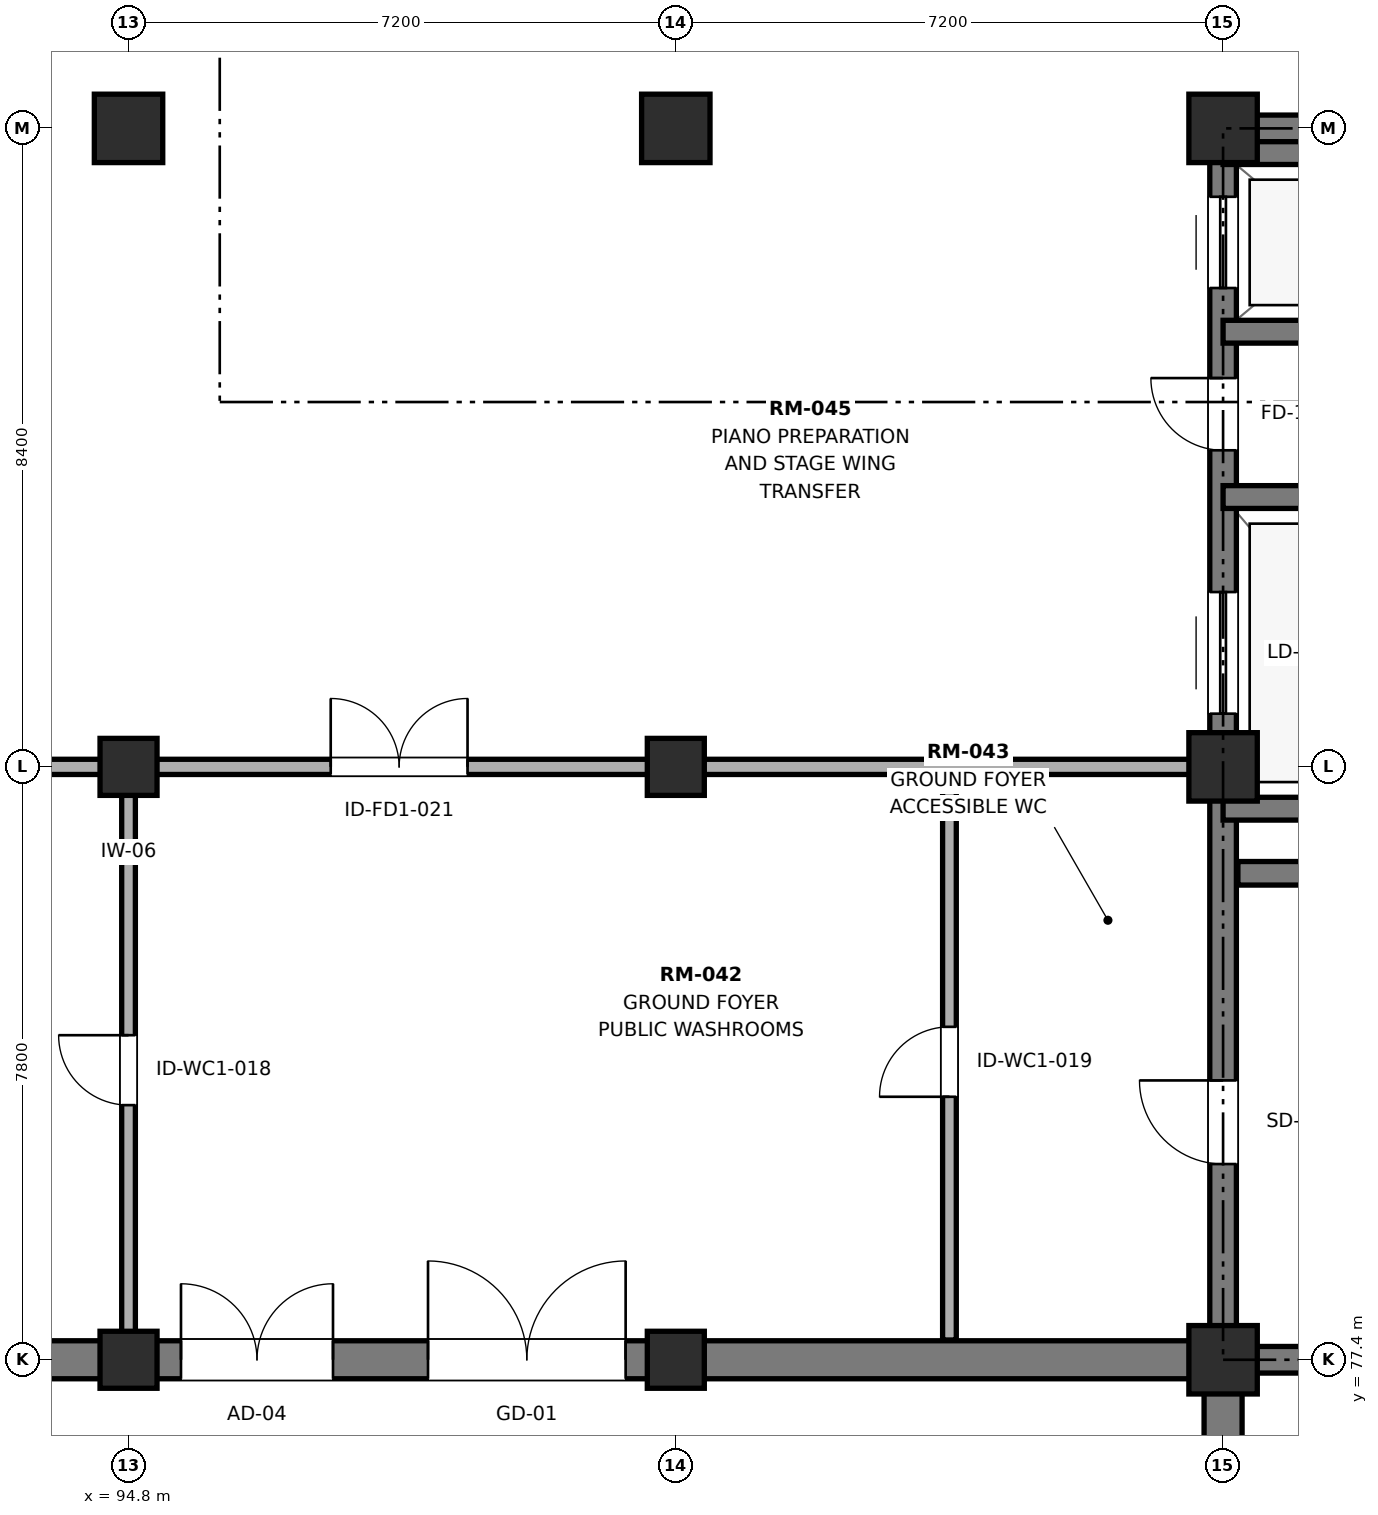
"""IFC4 building model, lengths in metres.
Left out: names, types, materials, properties, quantities, classifications, styles, units other than length and angle.
Written with IfcOpenShell. Run it as: python <this file> out.ifc"""

import sys

from ifc_helpers import new_model, si_unit, direction, frame, frame_2d, origin, origin_2d, place, context, subcontext, project, spatial, rectangle, extrude, element, fill, save


model = new_model("IFC4")
c1 = context("Model", 3, precision=1e-05, world=origin(), true_north=direction((0.0, 1.0)))
c2 = subcontext(c1, "Body", "Model", "MODEL_VIEW")
j1 = project(units=[si_unit("LENGTHUNIT", "METRE"), si_unit("PLANEANGLEUNIT", "RADIAN")], contexts=[c1])
p1 = place(None, origin())
s1 = spatial("IfcSite", under=j1, at=p1, CompositionType="ELEMENT")
p2 = place(p1, origin())
s2 = spatial("IfcBuilding", under=s1, at=p2, CompositionType="ELEMENT")
p3 = place(p2, origin())
s3 = spatial("IfcBuildingStorey", under=s2, at=p3, CompositionType="ELEMENT", Elevation=0.0)
for number, where, z_axis, x_axis in (
    (1, (94.8, 77.4, 0.0), (0.0, 0.0, 1.0), (1.0, 0.0, 0.0)),
    (2, (94.8, 85.2, 0.0), (0.0, 0.0, 1.0), (1.0, 0.0, 0.0)),
):
    element("IfcColumn", number, at=place(p3, frame(where, z_axis=z_axis, x_axis=x_axis)), inside=s3, PredefinedType="COLUMN", context=c2, shape_type="SweptSolid", body=[
        extrude(rectangle(XDim=0.75, YDim=0.75, at=origin_2d()), origin(), (0.0, 0.0, 1.0), 5.4),
    ])
p4 = place(p3, frame((94.8, 93.6, 0.0), z_axis=(0.0, 0.0, 1.0), x_axis=(1.0, 0.0, 0.0)))
e3 = element("IfcColumn", 3, at=p4, inside=s3, PredefinedType="COLUMN", context=c2, shape_type="SweptSolid", body=[
    extrude(rectangle(XDim=0.9, YDim=0.9, at=origin_2d()), origin(), (0.0, 0.0, 1.0), 5.4),
])
for number, where, z_axis, x_axis in (
    (4, (102.0, 77.4, 0.0), (0.0, 0.0, 1.0), (1.0, 0.0, 0.0)),
    (5, (102.0, 85.2, 0.0), (0.0, 0.0, 1.0), (1.0, 0.0, 0.0)),
):
    element("IfcColumn", number, at=place(p3, frame(where, z_axis=z_axis, x_axis=x_axis)), inside=s3, PredefinedType="COLUMN", context=c2, shape_type="SweptSolid", body=[
        extrude(rectangle(XDim=0.75, YDim=0.75, at=origin_2d()), origin(), (0.0, 0.0, 1.0), 5.4),
    ])
for number, where, z_axis, x_axis in (
    (6, (102.0, 93.6, 0.0), (0.0, 0.0, 1.0), (1.0, 0.0, 0.0)),
    (7, (109.2, 77.4, 0.0), (0.0, 0.0, 1.0), (1.0, 0.0, 0.0)),
    (8, (109.2, 85.2, 0.0), (0.0, 0.0, 1.0), (1.0, 0.0, 0.0)),
    (9, (109.2, 93.6, 0.0), (0.0, 0.0, 1.0), (1.0, 0.0, 0.0)),
):
    element("IfcColumn", number, at=place(p3, frame(where, z_axis=z_axis, x_axis=x_axis)), inside=s3, PredefinedType="COLUMN", context=c2, shape_type="SweptSolid", body=[
        extrude(rectangle(XDim=0.9, YDim=0.9, at=origin_2d()), origin(), (0.0, 0.0, 1.0), 5.4),
    ])
p5 = place(p3, frame((58.59, 77.4, 0.0), z_axis=(0.0, 0.0, 1.0), x_axis=(1.0, 0.0, 0.0)))
e10 = element("IfcWall", 10, at=p5, inside=s3, PredefinedType="SOLIDWALL", context=c2, shape_type="SweptSolid", body=[
    extrude(rectangle(XDim=50.82, YDim=0.5, at=frame_2d((25.41, 0.0))), origin(), (0.0, 0.0, 1.0), 5.4),
])
p6 = place(p5, frame((29.5, 0.0, 0.0)))
e11 = element("IfcOpeningElement", 11, at=p6, cuts=e10, PredefinedType="OPENING", context=c2, shape_type="SweptSolid", body=[
    extrude(rectangle(XDim=2.0, YDim=2.45, at=frame_2d((1.0, 1.225))), frame((0.0, 0.26, 0.0), z_axis=(0.0, -1.0, 0.0), x_axis=(1.0, 0.0, 0.0)), (0.0, 0.0, 1.0), 0.52),
])
p7 = place(p5, frame((36.9, 0.0, 0.0)))
e12 = element("IfcOpeningElement", 12, at=p7, cuts=e10, PredefinedType="OPENING", context=c2, shape_type="SweptSolid", body=[
    extrude(rectangle(XDim=2.0, YDim=2.45, at=frame_2d((1.0, 1.225))), frame((0.0, 0.26, 0.0), z_axis=(0.0, -1.0, 0.0), x_axis=(1.0, 0.0, 0.0)), (0.0, 0.0, 1.0), 0.52),
])
p8 = place(p5, frame((40.15, 0.0, 0.0)))
e13 = element("IfcOpeningElement", 13, at=p8, cuts=e10, PredefinedType="OPENING", context=c2, shape_type="SweptSolid", body=[
    extrude(rectangle(XDim=2.6, YDim=2.8, at=frame_2d((1.3, 1.4))), frame((0.0, 0.26, 0.0), z_axis=(0.0, -1.0, 0.0), x_axis=(1.0, 0.0, 0.0)), (0.0, 0.0, 1.0), 0.52),
])
p9 = place(p3, frame((109.2, 46.41, 0.0), z_axis=(0.0, 0.0, 1.0), x_axis=(0.0, 1.0, 0.0)))
e14 = element("IfcWall", 14, at=p9, inside=s3, PredefinedType="SOLIDWALL", context=c2, shape_type="SweptSolid", body=[
    extrude(rectangle(XDim=30.78, YDim=0.5, at=frame_2d((15.39, 0.0))), origin(), (0.0, 0.0, 1.0), 5.4),
])
p10 = place(p9, frame((12.0, 0.0, 0.0)))
e15 = element("IfcOpeningElement", 15, at=p10, cuts=e14, PredefinedType="OPENING", context=c2, shape_type="SweptSolid", body=[
    extrude(rectangle(XDim=2.0, YDim=2.45, at=frame_2d((1.0, 1.225))), frame((0.0, 0.26, 0.0), z_axis=(0.0, -1.0, 0.0), x_axis=(1.0, 0.0, 0.0)), (0.0, 0.0, 1.0), 0.52),
])
p11 = place(p3, frame((109.52, 77.4, 0.0), z_axis=(0.0, 0.0, 1.0), x_axis=(1.0, 0.0, 0.0)))
e16 = element("IfcWall", 16, at=p11, inside=s3, PredefinedType="SHEAR", context=c2, shape_type="SweptSolid", body=[
    extrude(rectangle(XDim=9.455, YDim=0.35, at=frame_2d((4.728, 0.0))), origin(), (0.0, 0.0, 1.0), 5.4),
])
p12 = place(p3, frame((109.025, 93.6, 0.0), z_axis=(0.0, 0.0, 1.0), x_axis=(1.0, 0.0, 0.0)))
e17 = element("IfcWall", 17, at=p12, inside=s3, PredefinedType="SHEAR", context=c2, shape_type="SweptSolid", body=[
    extrude(rectangle(XDim=9.95, YDim=0.35, at=frame_2d((4.975, 0.0))), origin(), (0.0, 0.0, 1.0), 5.4),
])
p13 = place(p3, frame((109.2, 77.575, 0.0), z_axis=(0.0, 0.0, 1.0), x_axis=(0.0, 1.0, 0.0)))
e18 = element("IfcWall", 18, at=p13, inside=s3, PredefinedType="SHEAR", context=c2, shape_type="SweptSolid", body=[
    extrude(rectangle(XDim=15.85, YDim=0.35, at=frame_2d((7.925, 0.0))), origin(), (0.0, 0.0, 1.0), 5.4),
])
p14 = place(p13, frame((8.325, 0.0, 0.0)))
e19 = element("IfcOpeningElement", 19, at=p14, cuts=e18, PredefinedType="OPENING", context=c2, shape_type="SweptSolid", body=[
    extrude(rectangle(XDim=1.6, YDim=2.4, at=frame_2d((0.8, 1.2))), frame((0.0, 0.185, 0.0), z_axis=(0.0, -1.0, 0.0), x_axis=(1.0, 0.0, 0.0)), (0.0, 0.0, 1.0), 0.37),
])
p15 = place(p13, frame((13.925, 0.0, 0.0)))
e20 = element("IfcOpeningElement", 20, at=p15, cuts=e18, PredefinedType="OPENING", context=c2, shape_type="SweptSolid", body=[
    extrude(rectangle(XDim=1.2, YDim=2.2, at=frame_2d((0.6, 1.1))), frame((0.0, 0.185, 0.0), z_axis=(0.0, -1.0, 0.0), x_axis=(1.0, 0.0, 0.0)), (0.0, 0.0, 1.0), 0.37),
])
p16 = place(p13, frame((11.79, 0.0, 0.0)))
e21 = element("IfcOpeningElement", 21, at=p16, cuts=e18, PredefinedType="OPENING", context=c2, shape_type="SweptSolid", body=[
    extrude(rectangle(XDim=0.95, YDim=2.1, at=frame_2d((0.475, 1.05))), frame((0.0, 0.185, 0.0), z_axis=(0.0, -1.0, 0.0), x_axis=(1.0, 0.0, 0.0)), (0.0, 0.0, 1.0), 0.37),
])
p17 = place(p13, frame((2.4, 0.0, 0.0)))
e22 = element("IfcOpeningElement", 22, at=p17, cuts=e18, PredefinedType="OPENING", context=c2, shape_type="SweptSolid", body=[
    extrude(rectangle(XDim=1.1, YDim=2.2, at=frame_2d((0.55, 1.1))), frame((0.0, 0.185, 0.0), z_axis=(0.0, -1.0, 0.0), x_axis=(1.0, 0.0, 0.0)), (0.0, 0.0, 1.0), 0.37),
])
p18 = place(p3, frame((109.395, 83.8, 0.0), z_axis=(0.0, 0.0, 1.0), x_axis=(1.0, 0.0, 0.0)))
e23 = element("IfcWall", 23, at=p18, inside=s3, PredefinedType="SHEAR", context=c2, shape_type="SweptSolid", body=[
    extrude(rectangle(XDim=9.21, YDim=0.31, at=frame_2d((4.605, 0.0))), origin(), (0.0, 0.0, 1.0), 5.4),
])
for number, where, z_axis, x_axis in (
    (24, (109.2, 84.65, 0.0), (0.0, 0.0, 1.0), (1.0, 0.0, 0.0)),
    (25, (109.2, 88.75, 0.0), (0.0, 0.0, 1.0), (1.0, 0.0, 0.0)),
):
    element("IfcWall", number, at=place(p3, frame(where, z_axis=z_axis, x_axis=x_axis)), inside=s3, PredefinedType="SHEAR", context=c2, shape_type="SweptSolid", body=[
        extrude(rectangle(XDim=3.5, YDim=0.3, at=frame_2d((1.75, 0.0))), origin(), (0.0, 0.0, 1.0), 5.4),
    ])
for number, where, z_axis, x_axis in (
    (26, (109.2, 90.925, 0.0), (0.0, 0.0, 1.0), (1.0, 0.0, 0.0)),
    (27, (109.2, 93.275, 0.0), (0.0, 0.0, 1.0), (1.0, 0.0, 0.0)),
):
    element("IfcWall", number, at=place(p3, frame(where, z_axis=z_axis, x_axis=x_axis)), inside=s3, PredefinedType="SHEAR", context=c2, shape_type="SweptSolid", body=[
        extrude(rectangle(XDim=2.8, YDim=0.3, at=frame_2d((1.4, 0.0))), origin(), (0.0, 0.0, 1.0), 5.4),
    ])
p19 = place(p3, frame((94.8, 77.55, 0.0), z_axis=(0.0, 0.0, 1.0), x_axis=(0.0, 1.0, 0.0)))
e28 = element("IfcWall", 28, at=p19, inside=s3, PredefinedType="PARTITIONING", context=c2, shape_type="SweptSolid", body=[
    extrude(rectangle(XDim=7.65, YDim=0.18, at=frame_2d((3.825, 0.0))), origin(), (0.0, 0.0, 1.0), 4.45),
])
p20 = place(p19, frame((3.2, 0.0, 0.0)))
e29 = element("IfcOpeningElement", 29, at=p20, cuts=e28, PredefinedType="OPENING", context=c2, shape_type="SweptSolid", body=[
    extrude(rectangle(XDim=0.92, YDim=2.15, at=frame_2d((0.46, 1.075))), frame((0.0, 0.1, 0.0), z_axis=(0.0, -1.0, 0.0), x_axis=(1.0, 0.0, 0.0)), (0.0, 0.0, 1.0), 0.2),
])
p21 = place(p3, frame((105.6, 77.66, 0.0), z_axis=(0.0, 0.0, 1.0), x_axis=(0.0, 1.0, 0.0)))
e30 = element("IfcWall", 30, at=p21, inside=s3, PredefinedType="PARTITIONING", context=c2, shape_type="SweptSolid", body=[
    extrude(rectangle(XDim=7.43, YDim=0.18, at=frame_2d((3.715, 0.0))), origin(), (0.0, 0.0, 1.0), 4.535),
])
p22 = place(p21, frame((3.2, 0.0, 0.0)))
e31 = element("IfcOpeningElement", 31, at=p22, cuts=e30, PredefinedType="OPENING", context=c2, shape_type="SweptSolid", body=[
    extrude(rectangle(XDim=0.92, YDim=2.15, at=frame_2d((0.46, 1.075))), frame((0.0, 0.1, 0.0), z_axis=(0.0, -1.0, 0.0), x_axis=(1.0, 0.0, 0.0)), (0.0, 0.0, 1.0), 0.2),
])
p23 = place(p3, frame((58.96, 85.2, 0.0), z_axis=(0.0, 0.0, 1.0), x_axis=(1.0, 0.0, 0.0)))
e32 = element("IfcWall", 32, at=p23, inside=s3, PredefinedType="PARTITIONING", context=c2, shape_type="SweptSolid", body=[
    extrude(rectangle(XDim=49.88, YDim=0.2, at=frame_2d((24.94, 0.0))), origin(), (0.0, 0.0, 1.0), 4.34),
])
p24 = place(p23, frame((12.0, 0.0, 0.0)))
e33 = element("IfcOpeningElement", 33, at=p24, cuts=e32, PredefinedType="OPENING", context=c2, shape_type="SweptSolid", body=[
    extrude(rectangle(XDim=1.05, YDim=2.25, at=frame_2d((0.525, 1.125))), frame((0.0, 0.11, 0.0), z_axis=(0.0, -1.0, 0.0), x_axis=(1.0, 0.0, 0.0)), (0.0, 0.0, 1.0), 0.22),
])
p25 = place(p23, frame((38.5, 0.0, 0.0)))
e34 = element("IfcOpeningElement", 34, at=p25, cuts=e32, PredefinedType="OPENING", context=c2, shape_type="SweptSolid", body=[
    extrude(rectangle(XDim=1.8, YDim=2.3, at=frame_2d((0.9, 1.15))), frame((0.0, 0.11, 0.0), z_axis=(0.0, -1.0, 0.0), x_axis=(1.0, 0.0, 0.0)), (0.0, 0.0, 1.0), 0.22),
])
p26 = place(p14, origin())
e35 = element("IfcDoor", 35, at=p26, inside=s3, OperationType="SLIDING_TO_RIGHT", PredefinedType="DOOR", context=c2, shape_type="SweptSolid", body=[
    extrude(rectangle(XDim=1.6, YDim=2.4, at=frame_2d((0.8, 1.2))), frame((0.0, 0.025, 0.0), z_axis=(0.0, -1.0, 0.0), x_axis=(1.0, 0.0, 0.0)), (0.0, 0.0, 1.0), 0.05),
])
fill(e19, e35)
p27 = place(p15, origin())
e36 = element("IfcDoor", 36, at=p27, inside=s3, OperationType="SLIDING_TO_LEFT", PredefinedType="DOOR", context=c2, shape_type="SweptSolid", body=[
    extrude(rectangle(XDim=1.2, YDim=2.2, at=frame_2d((0.6, 1.1))), frame((0.0, 0.025, 0.0), z_axis=(0.0, -1.0, 0.0), x_axis=(1.0, 0.0, 0.0)), (0.0, 0.0, 1.0), 0.05),
])
fill(e20, e36)
p28 = place(p16, origin())
e37 = element("IfcDoor", 37, at=p28, inside=s3, OperationType="SINGLE_SWING_RIGHT", PredefinedType="DOOR", context=c2, shape_type="SweptSolid", body=[
    extrude(rectangle(XDim=0.95, YDim=2.1, at=frame_2d((0.475, 1.05))), frame((0.0, 0.025, 0.0), z_axis=(0.0, -1.0, 0.0), x_axis=(1.0, 0.0, 0.0)), (0.0, 0.0, 1.0), 0.05),
])
fill(e21, e37)
p29 = place(p17, origin())
e38 = element("IfcDoor", 38, at=p29, inside=s3, OperationType="SINGLE_SWING_RIGHT", PredefinedType="DOOR", context=c2, shape_type="SweptSolid", body=[
    extrude(rectangle(XDim=1.1, YDim=2.2, at=frame_2d((0.55, 1.1))), frame((0.0, 0.025, 0.0), z_axis=(0.0, -1.0, 0.0), x_axis=(1.0, 0.0, 0.0)), (0.0, 0.0, 1.0), 0.05),
])
fill(e22, e38)
p30 = place(p7, origin())
e39 = element("IfcDoor", 39, at=p30, inside=s3, OperationType="DOUBLE_DOOR_SINGLE_SWING", PredefinedType="DOOR", context=c2, shape_type="SweptSolid", body=[
    extrude(rectangle(XDim=2.0, YDim=2.45, at=frame_2d((1.0, 1.225))), frame((0.0, 0.025, 0.0), z_axis=(0.0, -1.0, 0.0), x_axis=(1.0, 0.0, 0.0)), (0.0, 0.0, 1.0), 0.05),
])
fill(e12, e39)
p31 = place(p8, origin())
e40 = element("IfcDoor", 40, at=p31, inside=s3, OperationType="DOUBLE_DOOR_SINGLE_SWING", PredefinedType="GATE", context=c2, shape_type="SweptSolid", body=[
    extrude(rectangle(XDim=2.6, YDim=2.8, at=frame_2d((1.3, 1.4))), frame((0.0, 0.025, 0.0), z_axis=(0.0, -1.0, 0.0), x_axis=(1.0, 0.0, 0.0)), (0.0, 0.0, 1.0), 0.05),
])
fill(e13, e40)
p32 = place(p20, origin())
e41 = element("IfcDoor", 41, at=p32, inside=s3, OperationType="SINGLE_SWING_RIGHT", PredefinedType="DOOR", context=c2, shape_type="SweptSolid", body=[
    extrude(rectangle(XDim=0.92, YDim=2.15, at=frame_2d((0.46, 1.075))), frame((0.0, 0.025, 0.0), z_axis=(0.0, -1.0, 0.0), x_axis=(1.0, 0.0, 0.0)), (0.0, 0.0, 1.0), 0.05),
])
fill(e29, e41)
p33 = place(p22, origin())
e42 = element("IfcDoor", 42, at=p33, inside=s3, OperationType="SINGLE_SWING_LEFT", PredefinedType="DOOR", context=c2, shape_type="SweptSolid", body=[
    extrude(rectangle(XDim=0.92, YDim=2.15, at=frame_2d((0.46, 1.075))), frame((0.0, 0.025, 0.0), z_axis=(0.0, -1.0, 0.0), x_axis=(1.0, 0.0, 0.0)), (0.0, 0.0, 1.0), 0.05),
])
fill(e31, e42)
p34 = place(p25, origin())
e43 = element("IfcDoor", 43, at=p34, inside=s3, OperationType="DOUBLE_DOOR_SINGLE_SWING", PredefinedType="DOOR", context=c2, shape_type="SweptSolid", body=[
    extrude(rectangle(XDim=1.8, YDim=2.3, at=frame_2d((0.9, 1.15))), frame((0.0, 0.025, 0.0), z_axis=(0.0, -1.0, 0.0), x_axis=(1.0, 0.0, 0.0)), (0.0, 0.0, 1.0), 0.05),
])
fill(e34, e43)
save(model, sys.argv[1])
